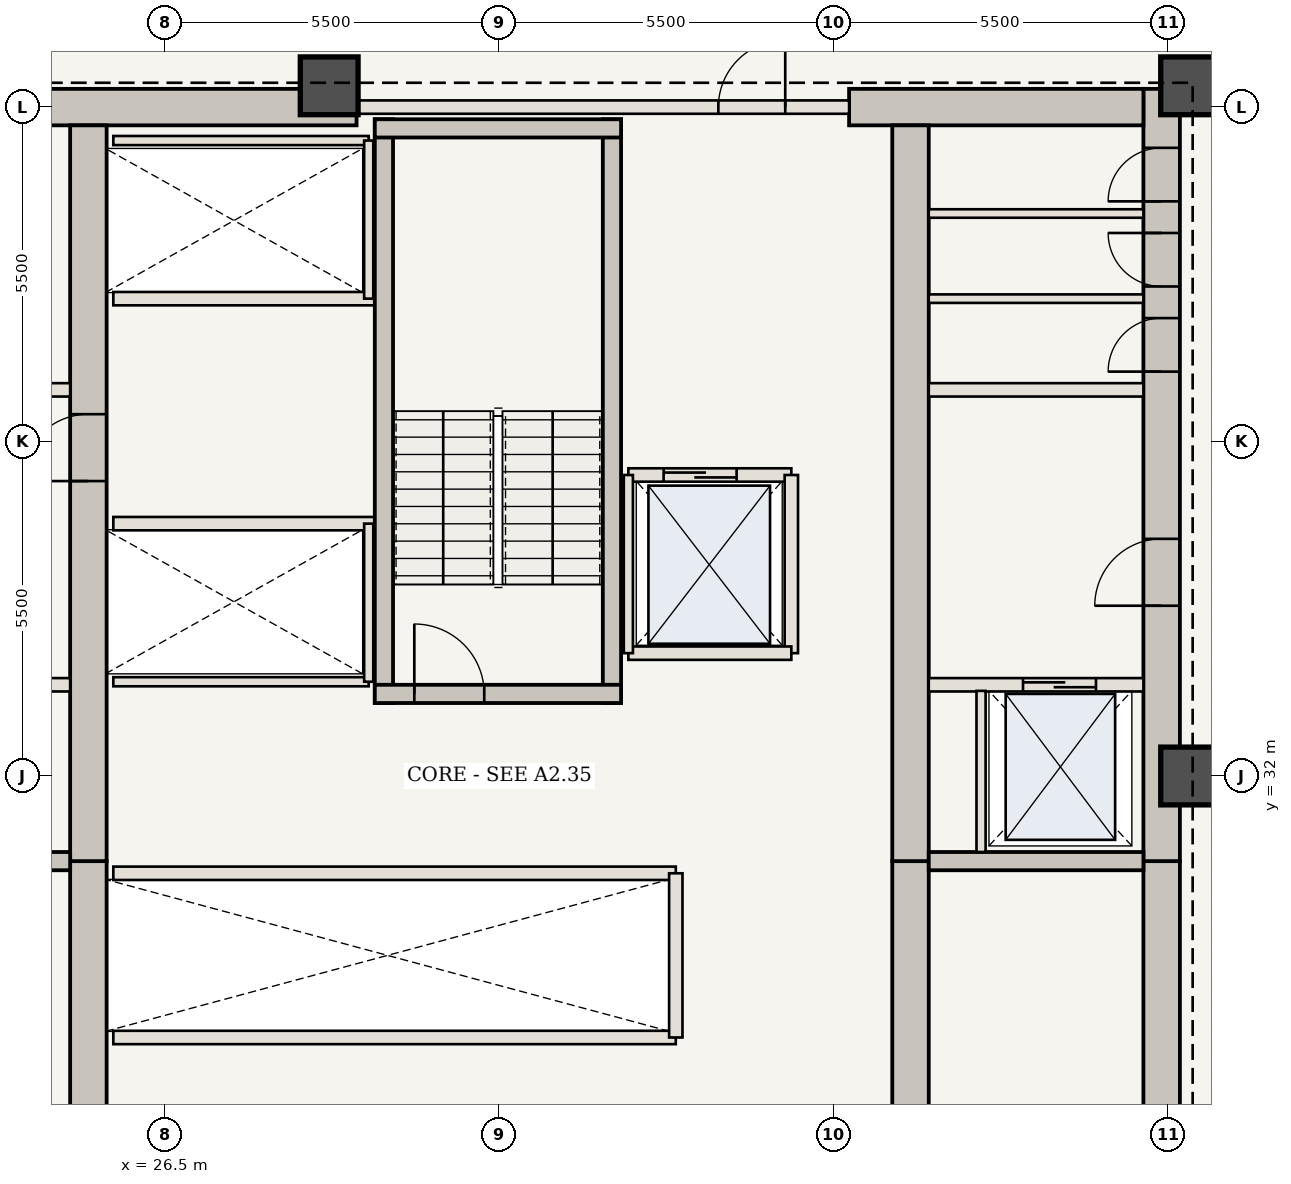
"""IFC4 building model, lengths in metres.
Left out: names, types, materials, properties, quantities, classifications, styles, units other than length and angle.
Written with IfcOpenShell. Run it as: python <this file> out.ifc"""

import sys

from ifc_helpers import new_model, si_unit, direction, frame, frame_2d, origin, origin_2d, place, context, subcontext, project, spatial, rectangle, extrude, element, fill, save


model = new_model("IFC4")
c1 = context("Model", 3, precision=1e-05, world=origin(), true_north=direction((0.0, 1.0)))
c2 = subcontext(c1, "Body", "Model", "MODEL_VIEW")
j1 = project(units=[si_unit("LENGTHUNIT", "METRE"), si_unit("PLANEANGLEUNIT", "RADIAN")], contexts=[c1])
p1 = place(None, origin())
s1 = spatial("IfcSite", under=j1, at=p1, CompositionType="ELEMENT")
p2 = place(p1, origin())
s2 = spatial("IfcBuilding", under=s1, at=p2, CompositionType="ELEMENT")
p3 = place(p2, frame((0.0, 0.0, 149.1)))
s3 = spatial("IfcBuildingStorey", under=s2, at=p3, CompositionType="ELEMENT", Elevation=149.1)
p4 = place(p3, frame((42.89, 20.65, 0.0), z_axis=(0.0, 0.0, 1.0), x_axis=(0.0, 1.0, 0.0)))
e1 = element("IfcWall", 1, at=p4, inside=s3, PredefinedType="SHEAR", context=c2, shape_type="SweptSolid", body=[
    extrude(rectangle(XDim=9.95, YDim=0.6, at=frame_2d((4.975, 0.0))), origin(), (0.0, 0.0, 1.0), 3.85),
])
p5 = place(p4, frame((1.1, 0.0, 0.0)))
e2 = element("IfcOpeningElement", 2, at=p5, cuts=e1, PredefinedType="OPENING", context=c2, shape_type="SweptSolid", body=[
    extrude(rectangle(XDim=1.15, YDim=2.15, at=frame_2d((0.575, 1.075))), frame((0.0, 0.31, 0.0), z_axis=(0.0, -1.0, 0.0), x_axis=(1.0, 0.0, 0.0)), (0.0, 0.0, 1.0), 0.62),
])
p6 = place(p3, frame((42.89, 30.6, 0.0), z_axis=(0.0, 0.0, 1.0), x_axis=(0.0, 1.0, 0.0)))
e3 = element("IfcWall", 3, at=p6, inside=s3, PredefinedType="SHEAR", context=c2, shape_type="SweptSolid", body=[
    extrude(rectangle(XDim=12.7, YDim=0.6, at=frame_2d((6.35, 0.0))), origin(), (0.0, 0.0, 1.0), 3.85),
])
p7 = place(p6, frame((4.2, 0.0, 0.0)))
e4 = element("IfcOpeningElement", 4, at=p7, cuts=e3, PredefinedType="OPENING", context=c2, shape_type="SweptSolid", body=[
    extrude(rectangle(XDim=1.1, YDim=2.15, at=frame_2d((0.55, 1.075))), frame((0.0, 0.31, 0.0), z_axis=(0.0, -1.0, 0.0), x_axis=(1.0, 0.0, 0.0)), (0.0, 0.0, 1.0), 0.62),
])
p8 = place(p6, frame((8.05, 0.0, 0.0)))
e5 = element("IfcOpeningElement", 5, at=p8, cuts=e3, PredefinedType="OPENING", context=c2, shape_type="SweptSolid", body=[
    extrude(rectangle(XDim=0.88, YDim=2.1, at=frame_2d((0.44, 1.05))), frame((0.0, 0.31, 0.0), z_axis=(0.0, -1.0, 0.0), x_axis=(1.0, 0.0, 0.0)), (0.0, 0.0, 1.0), 0.62),
])
p9 = place(p6, frame((9.45, 0.0, 0.0)))
e6 = element("IfcOpeningElement", 6, at=p9, cuts=e3, PredefinedType="OPENING", context=c2, shape_type="SweptSolid", body=[
    extrude(rectangle(XDim=0.88, YDim=2.1, at=frame_2d((0.44, 1.05))), frame((0.0, 0.31, 0.0), z_axis=(0.0, -1.0, 0.0), x_axis=(1.0, 0.0, 0.0)), (0.0, 0.0, 1.0), 0.62),
])
p10 = place(p6, frame((10.85, 0.0, 0.0)))
e7 = element("IfcOpeningElement", 7, at=p10, cuts=e3, PredefinedType="OPENING", context=c2, shape_type="SweptSolid", body=[
    extrude(rectangle(XDim=0.88, YDim=2.1, at=frame_2d((0.44, 1.05))), frame((0.0, 0.31, 0.0), z_axis=(0.0, -1.0, 0.0), x_axis=(1.0, 0.0, 0.0)), (0.0, 0.0, 1.0), 0.62),
])
p11 = place(p3, frame((21.41, 43.0, 0.0), z_axis=(0.0, 0.0, 1.0), x_axis=(1.0, 0.0, 0.0)))
e8 = element("IfcWall", 8, at=p11, inside=s3, PredefinedType="SHEAR", context=c2, shape_type="SweptSolid", body=[
    extrude(rectangle(XDim=8.24, YDim=0.6, at=frame_2d((4.12, 0.0))), origin(), (0.0, 0.0, 1.0), 3.85),
])
p12 = place(p3, frame((37.75, 43.0, 0.0), z_axis=(0.0, 0.0, 1.0), x_axis=(1.0, 0.0, 0.0)))
e9 = element("IfcWall", 9, at=p12, inside=s3, PredefinedType="SHEAR", context=c2, shape_type="SweptSolid", body=[
    extrude(rectangle(XDim=4.84, YDim=0.6, at=frame_2d((2.42, 0.0))), origin(), (0.0, 0.0, 1.0), 3.85),
])
p13 = place(p3, frame((25.24, 21.25, 0.0), z_axis=(0.0, 0.0, 1.0), x_axis=(0.0, 1.0, 0.0)))
e10 = element("IfcWall", 10, at=p13, inside=s3, PredefinedType="SHEAR", context=c2, shape_type="SweptSolid", body=[
    extrude(rectangle(XDim=9.35, YDim=0.6, at=frame_2d((4.675, 0.0))), origin(), (0.0, 0.0, 1.0), 3.85),
])
p14 = place(p3, frame((25.24, 30.6, 0.0), z_axis=(0.0, 0.0, 1.0), x_axis=(0.0, 1.0, 0.0)))
e11 = element("IfcWall", 11, at=p14, inside=s3, PredefinedType="SHEAR", context=c2, shape_type="SweptSolid", body=[
    extrude(rectangle(XDim=12.1, YDim=0.6, at=frame_2d((6.05, 0.0))), origin(), (0.0, 0.0, 1.0), 3.85),
])
p15 = place(p14, frame((6.25, 0.0, 0.0)))
e12 = element("IfcOpeningElement", 12, at=p15, cuts=e11, PredefinedType="OPENING", context=c2, shape_type="SweptSolid", body=[
    extrude(rectangle(XDim=1.1, YDim=2.15, at=frame_2d((0.55, 1.075))), frame((0.0, 0.31, 0.0), z_axis=(0.0, -1.0, 0.0), x_axis=(1.0, 0.0, 0.0)), (0.0, 0.0, 1.0), 0.62),
])
p16 = place(p3, frame((38.76, 21.25, 0.0), z_axis=(0.0, 0.0, 1.0), x_axis=(0.0, 1.0, 0.0)))
e13 = element("IfcWall", 13, at=p16, inside=s3, PredefinedType="SHEAR", context=c2, shape_type="SweptSolid", body=[
    extrude(rectangle(XDim=9.35, YDim=0.6, at=frame_2d((4.675, 0.0))), origin(), (0.0, 0.0, 1.0), 3.85),
])
p17 = place(p3, frame((38.76, 30.6, 0.0), z_axis=(0.0, 0.0, 1.0), x_axis=(0.0, 1.0, 0.0)))
e14 = element("IfcWall", 14, at=p17, inside=s3, PredefinedType="SHEAR", context=c2, shape_type="SweptSolid", body=[
    extrude(rectangle(XDim=12.1, YDim=0.6, at=frame_2d((6.05, 0.0))), origin(), (0.0, 0.0, 1.0), 3.85),
])
for number, where, z_axis, x_axis in (
    (15, (43.35, 32.0, 0.0), (0.0, 0.0, 1.0), (1.0, 0.0, 0.0)),
    (16, (43.35, 43.35, 0.0), (0.0, 0.0, 1.0), (1.0, 0.0, 0.0)),
    (17, (29.2, 43.35, 0.0), (0.0, 0.0, 1.0), (1.0, 0.0, 0.0)),
):
    element("IfcColumn", number, at=place(p3, frame(where, z_axis=z_axis, x_axis=x_axis)), inside=s3, PredefinedType="COLUMN", context=c2, shape_type="SweptSolid", body=[
        extrude(rectangle(XDim=0.95, YDim=0.95, at=origin_2d()), origin(), (0.0, 0.0, 1.0), 3.85),
    ])
for number, where, z_axis, x_axis in (
    (18, (21.41, 30.6, 0.0), (0.0, 0.0, 1.0), (1.0, 0.0, 0.0)),
    (19, (39.06, 30.6, 0.0), (0.0, 0.0, 1.0), (1.0, 0.0, 0.0)),
):
    element("IfcWall", number, at=place(p3, frame(where, z_axis=z_axis, x_axis=x_axis)), inside=s3, PredefinedType="SHEAR", context=c2, shape_type="SweptSolid", body=[
        extrude(rectangle(XDim=3.53, YDim=0.3, at=frame_2d((1.765, 0.0))), origin(), (0.0, 0.0, 1.0), 3.685),
    ])
p18 = place(p3, frame((21.41, 33.5, 0.0), z_axis=(0.0, 0.0, 1.0), x_axis=(1.0, 0.0, 0.0)))
e20 = element("IfcWall", 20, at=p18, inside=s3, PredefinedType="STANDARD", context=c2, shape_type="SweptSolid", body=[
    extrude(rectangle(XDim=3.53, YDim=0.22, at=frame_2d((1.765, 0.0))), origin(), (0.0, 0.0, 1.0), 3.685),
])
p19 = place(p18, frame((0.75, 0.0, 0.0)))
e21 = element("IfcOpeningElement", 21, at=p19, cuts=e20, PredefinedType="OPENING", context=c2, shape_type="SweptSolid", body=[
    extrude(rectangle(XDim=1.2, YDim=2.2, at=frame_2d((0.6, 1.1))), frame((0.0, 0.12, 0.0), z_axis=(0.0, -1.0, 0.0), x_axis=(1.0, 0.0, 0.0)), (0.0, 0.0, 1.0), 0.24),
])
p20 = place(p3, frame((39.06, 33.5, 0.0), z_axis=(0.0, 0.0, 1.0), x_axis=(1.0, 0.0, 0.0)))
e22 = element("IfcWall", 22, at=p20, inside=s3, PredefinedType="STANDARD", context=c2, shape_type="SweptSolid", body=[
    extrude(rectangle(XDim=3.53, YDim=0.22, at=frame_2d((1.765, 0.0))), origin(), (0.0, 0.0, 1.0), 3.685),
])
p21 = place(p20, frame((1.55, 0.0, 0.0)))
e23 = element("IfcOpeningElement", 23, at=p21, cuts=e22, PredefinedType="OPENING", context=c2, shape_type="SweptSolid", body=[
    extrude(rectangle(XDim=1.2, YDim=2.2, at=frame_2d((0.6, 1.1))), frame((0.0, 0.12, 0.0), z_axis=(0.0, -1.0, 0.0), x_axis=(1.0, 0.0, 0.0)), (0.0, 0.0, 1.0), 0.24),
])
p22 = place(p3, frame((39.92, 30.75, 0.0), z_axis=(0.0, 0.0, 1.0), x_axis=(0.0, 1.0, 0.0)))
e24 = element("IfcWall", 24, at=p22, inside=s3, PredefinedType="STANDARD", context=c2, shape_type="SweptSolid", body=[
    extrude(rectangle(XDim=2.65, YDim=0.15, at=frame_2d((1.325, 0.0))), origin(), (0.0, 0.0, 1.0), 3.685),
])
for number, where, z_axis, x_axis in (
    (25, (21.41, 38.35, 0.0), (0.0, 0.0, 1.0), (1.0, 0.0, 0.0)),
    (26, (39.06, 38.35, 0.0), (0.0, 0.0, 1.0), (1.0, 0.0, 0.0)),
):
    element("IfcWall", number, at=place(p3, frame(where, z_axis=z_axis, x_axis=x_axis)), inside=s3, PredefinedType="STANDARD", context=c2, shape_type="SweptSolid", body=[
        extrude(rectangle(XDim=3.53, YDim=0.22, at=frame_2d((1.765, 0.0))), origin(), (0.0, 0.0, 1.0), 3.685),
    ])
for number, where, z_axis, x_axis in (
    (27, (39.06, 39.85, 0.0), (0.0, 0.0, 1.0), (1.0, 0.0, 0.0)),
    (28, (39.06, 41.25, 0.0), (0.0, 0.0, 1.0), (1.0, 0.0, 0.0)),
):
    element("IfcWall", number, at=place(p3, frame(where, z_axis=z_axis, x_axis=x_axis)), inside=s3, PredefinedType="STANDARD", context=c2, shape_type="SweptSolid", body=[
        extrude(rectangle(XDim=3.53, YDim=0.14, at=frame_2d((1.765, 0.0))), origin(), (0.0, 0.0, 1.0), 3.685),
    ])
for number, where, z_axis, x_axis in (
    (29, (25.65, 27.7, 0.0), (0.0, 0.0, 1.0), (1.0, 0.0, 0.0)),
    (30, (25.65, 30.4, 0.0), (0.0, 0.0, 1.0), (1.0, 0.0, 0.0)),
):
    element("IfcWall", number, at=place(p3, frame(where, z_axis=z_axis, x_axis=x_axis)), inside=s3, PredefinedType="STANDARD", context=c2, shape_type="SweptSolid", body=[
        extrude(rectangle(XDim=9.25, YDim=0.22, at=frame_2d((4.625, 0.0))), origin(), (0.0, 0.0, 1.0), 3.685),
    ])
p23 = place(p3, frame((34.9, 27.7, 0.0), z_axis=(0.0, 0.0, 1.0), x_axis=(0.0, 1.0, 0.0)))
e31 = element("IfcWall", 31, at=p23, inside=s3, PredefinedType="STANDARD", context=c2, shape_type="SweptSolid", body=[
    extrude(rectangle(XDim=2.7, YDim=0.22, at=frame_2d((1.35, 0.0))), origin(), (0.0, 0.0, 1.0), 3.685),
])
p24 = place(p3, frame((25.65, 36.15, 0.0), z_axis=(0.0, 0.0, 1.0), x_axis=(1.0, 0.0, 0.0)))
e32 = element("IfcWall", 32, at=p24, inside=s3, PredefinedType="STANDARD", context=c2, shape_type="SweptSolid", body=[
    extrude(rectangle(XDim=4.3, YDim=0.22, at=frame_2d((2.15, 0.0))), origin(), (0.0, 0.0, 1.0), 3.685),
])
p25 = place(p3, frame((25.65, 33.55, 0.0), z_axis=(0.0, 0.0, 1.0), x_axis=(1.0, 0.0, 0.0)))
e33 = element("IfcWall", 33, at=p25, inside=s3, PredefinedType="STANDARD", context=c2, shape_type="SweptSolid", body=[
    extrude(rectangle(XDim=4.2, YDim=0.15, at=frame_2d((2.1, 0.0))), origin(), (0.0, 0.0, 1.0), 3.685),
])
p26 = place(p3, frame((29.85, 33.55, 0.0), z_axis=(0.0, 0.0, 1.0), x_axis=(0.0, 1.0, 0.0)))
e34 = element("IfcWall", 34, at=p26, inside=s3, PredefinedType="STANDARD", context=c2, shape_type="SweptSolid", body=[
    extrude(rectangle(XDim=2.6, YDim=0.15, at=frame_2d((1.3, 0.0))), origin(), (0.0, 0.0, 1.0), 3.685),
])
p27 = place(p3, frame((25.65, 39.85, 0.0), z_axis=(0.0, 0.0, 1.0), x_axis=(1.0, 0.0, 0.0)))
e35 = element("IfcWall", 35, at=p27, inside=s3, PredefinedType="STANDARD", context=c2, shape_type="SweptSolid", body=[
    extrude(rectangle(XDim=4.3, YDim=0.22, at=frame_2d((2.15, 0.0))), origin(), (0.0, 0.0, 1.0), 3.685),
])
p28 = place(p3, frame((25.65, 42.45, 0.0), z_axis=(0.0, 0.0, 1.0), x_axis=(1.0, 0.0, 0.0)))
e36 = element("IfcWall", 36, at=p28, inside=s3, PredefinedType="STANDARD", context=c2, shape_type="SweptSolid", body=[
    extrude(rectangle(XDim=4.2, YDim=0.15, at=frame_2d((2.1, 0.0))), origin(), (0.0, 0.0, 1.0), 3.685),
])
p29 = place(p3, frame((29.85, 39.85, 0.0), z_axis=(0.0, 0.0, 1.0), x_axis=(0.0, 1.0, 0.0)))
e37 = element("IfcWall", 37, at=p29, inside=s3, PredefinedType="STANDARD", context=c2, shape_type="SweptSolid", body=[
    extrude(rectangle(XDim=2.6, YDim=0.15, at=frame_2d((1.3, 0.0))), origin(), (0.0, 0.0, 1.0), 3.685),
])
for number, where, z_axis, x_axis in (
    (38, (30.1, 33.2, 0.0), (0.0, 0.0, 1.0), (0.0, 1.0, 0.0)),
    (39, (33.85, 33.2, 0.0), (0.0, 0.0, 1.0), (0.0, 1.0, 0.0)),
):
    element("IfcWall", number, at=place(p3, frame(where, z_axis=z_axis, x_axis=x_axis)), inside=s3, PredefinedType="SHEAR", context=c2, shape_type="SweptSolid", body=[
        extrude(rectangle(XDim=9.6, YDim=0.3, at=frame_2d((4.8, 0.0))), origin(), (0.0, 0.0, 1.0), 3.685),
    ])
p30 = place(p3, frame((29.95, 33.35, 0.0), z_axis=(0.0, 0.0, 1.0), x_axis=(1.0, 0.0, 0.0)))
e40 = element("IfcWall", 40, at=p30, inside=s3, PredefinedType="SHEAR", context=c2, shape_type="SweptSolid", body=[
    extrude(rectangle(XDim=4.05, YDim=0.3, at=frame_2d((2.025, 0.0))), origin(), (0.0, 0.0, 1.0), 3.685),
])
p31 = place(p30, frame((0.65, 0.0, 0.0)))
e41 = element("IfcOpeningElement", 41, at=p31, cuts=e40, PredefinedType="OPENING", context=c2, shape_type="SweptSolid", body=[
    extrude(rectangle(XDim=1.15, YDim=2.15, at=frame_2d((0.575, 1.075))), frame((0.0, 0.16, 0.0), z_axis=(0.0, -1.0, 0.0), x_axis=(1.0, 0.0, 0.0)), (0.0, 0.0, 1.0), 0.32),
])
p32 = place(p3, frame((29.95, 42.65, 0.0), z_axis=(0.0, 0.0, 1.0), x_axis=(1.0, 0.0, 0.0)))
e42 = element("IfcWall", 42, at=p32, inside=s3, PredefinedType="SHEAR", context=c2, shape_type="SweptSolid", body=[
    extrude(rectangle(XDim=4.05, YDim=0.3, at=frame_2d((2.025, 0.0))), origin(), (0.0, 0.0, 1.0), 3.685),
])
p33 = place(p3, frame((29.65, 43.0, 0.0), z_axis=(0.0, 0.0, 1.0), x_axis=(1.0, 0.0, 0.0)))
e43 = element("IfcWall", 43, at=p33, inside=s3, PredefinedType="STANDARD", context=c2, shape_type="SweptSolid", body=[
    extrude(rectangle(XDim=8.1, YDim=0.22, at=frame_2d((4.05, 0.0))), origin(), (0.0, 0.0, 1.0), 3.685),
])
p34 = place(p33, frame((5.95, 0.0, 0.0)))
e44 = element("IfcOpeningElement", 44, at=p34, cuts=e43, PredefinedType="OPENING", context=c2, shape_type="SweptSolid", body=[
    extrude(rectangle(XDim=1.1, YDim=2.15, at=frame_2d((0.55, 1.075))), frame((0.0, 0.12, 0.0), z_axis=(0.0, -1.0, 0.0), x_axis=(1.0, 0.0, 0.0)), (0.0, 0.0, 1.0), 0.24),
])
p35 = place(p3, frame((34.12, 36.95, 0.0), z_axis=(0.0, 0.0, 1.0), x_axis=(1.0, 0.0, 0.0)))
e45 = element("IfcWall", 45, at=p35, inside=s3, PredefinedType="STANDARD", context=c2, shape_type="SweptSolid", body=[
    extrude(rectangle(XDim=2.68, YDim=0.22, at=frame_2d((1.34, 0.0))), origin(), (0.0, 0.0, 1.0), 3.685),
])
p36 = place(p35, frame((0.58, 0.0, 0.0)))
e46 = element("IfcOpeningElement", 46, at=p36, cuts=e45, PredefinedType="OPENING", context=c2, shape_type="SweptSolid", body=[
    extrude(rectangle(XDim=1.2, YDim=2.2, at=frame_2d((0.6, 1.1))), frame((0.0, 0.12, 0.0), z_axis=(0.0, -1.0, 0.0), x_axis=(1.0, 0.0, 0.0)), (0.0, 0.0, 1.0), 0.24),
])
p37 = place(p3, frame((36.8, 34.02, 0.0), z_axis=(0.0, 0.0, 1.0), x_axis=(0.0, 1.0, 0.0)))
e47 = element("IfcWall", 47, at=p37, inside=s3, PredefinedType="STANDARD", context=c2, shape_type="SweptSolid", body=[
    extrude(rectangle(XDim=2.93, YDim=0.22, at=frame_2d((1.465, 0.0))), origin(), (0.0, 0.0, 1.0), 3.685),
])
p38 = place(p3, frame((34.12, 34.02, 0.0), z_axis=(0.0, 0.0, 1.0), x_axis=(1.0, 0.0, 0.0)))
e48 = element("IfcWall", 48, at=p38, inside=s3, PredefinedType="STANDARD", context=c2, shape_type="SweptSolid", body=[
    extrude(rectangle(XDim=2.68, YDim=0.22, at=frame_2d((1.34, 0.0))), origin(), (0.0, 0.0, 1.0), 3.685),
])
p39 = place(p3, frame((34.12, 34.02, 0.0), z_axis=(0.0, 0.0, 1.0), x_axis=(0.0, 1.0, 0.0)))
e49 = element("IfcWall", 49, at=p39, inside=s3, PredefinedType="STANDARD", context=c2, shape_type="SweptSolid", body=[
    extrude(rectangle(XDim=2.93, YDim=0.15, at=frame_2d((1.465, 0.0))), origin(), (0.0, 0.0, 1.0), 3.685),
])
p40 = place(p7, origin())
e50 = element("IfcDoor", 50, at=p40, inside=s3, OperationType="SINGLE_SWING_LEFT", PredefinedType="DOOR", context=c2, shape_type="SweptSolid", body=[
    extrude(rectangle(XDim=1.1, YDim=2.15, at=frame_2d((0.55, 1.075))), frame((0.0, 0.025, 0.0), z_axis=(0.0, -1.0, 0.0), x_axis=(1.0, 0.0, 0.0)), (0.0, 0.0, 1.0), 0.05),
])
fill(e4, e50)
p41 = place(p15, origin())
e51 = element("IfcDoor", 51, at=p41, inside=s3, OperationType="SINGLE_SWING_LEFT", PredefinedType="DOOR", context=c2, shape_type="SweptSolid", body=[
    extrude(rectangle(XDim=1.1, YDim=2.15, at=frame_2d((0.55, 1.075))), frame((0.0, 0.025, 0.0), z_axis=(0.0, -1.0, 0.0), x_axis=(1.0, 0.0, 0.0)), (0.0, 0.0, 1.0), 0.05),
])
fill(e12, e51)
p42 = place(p8, origin())
e52 = element("IfcDoor", 52, at=p42, inside=s3, OperationType="SINGLE_SWING_LEFT", PredefinedType="DOOR", context=c2, shape_type="SweptSolid", body=[
    extrude(rectangle(XDim=0.88, YDim=2.1, at=frame_2d((0.44, 1.05))), frame((0.0, 0.025, 0.0), z_axis=(0.0, -1.0, 0.0), x_axis=(1.0, 0.0, 0.0)), (0.0, 0.0, 1.0), 0.05),
])
fill(e5, e52)
p43 = place(p9, origin())
e53 = element("IfcDoor", 53, at=p43, inside=s3, OperationType="SINGLE_SWING_RIGHT", PredefinedType="DOOR", context=c2, shape_type="SweptSolid", body=[
    extrude(rectangle(XDim=0.88, YDim=2.1, at=frame_2d((0.44, 1.05))), frame((0.0, 0.025, 0.0), z_axis=(0.0, -1.0, 0.0), x_axis=(1.0, 0.0, 0.0)), (0.0, 0.0, 1.0), 0.05),
])
fill(e6, e53)
p44 = place(p10, origin())
e54 = element("IfcDoor", 54, at=p44, inside=s3, OperationType="SINGLE_SWING_LEFT", PredefinedType="DOOR", context=c2, shape_type="SweptSolid", body=[
    extrude(rectangle(XDim=0.88, YDim=2.1, at=frame_2d((0.44, 1.05))), frame((0.0, 0.025, 0.0), z_axis=(0.0, -1.0, 0.0), x_axis=(1.0, 0.0, 0.0)), (0.0, 0.0, 1.0), 0.05),
])
fill(e7, e54)
p45 = place(p21, origin())
e55 = element("IfcDoor", 55, at=p45, inside=s3, OperationType="DOUBLE_DOOR_SLIDING", PredefinedType="DOOR", context=c2, shape_type="SweptSolid", body=[
    extrude(rectangle(XDim=1.2, YDim=2.2, at=frame_2d((0.6, 1.1))), frame((0.0, 0.025, 0.0), z_axis=(0.0, -1.0, 0.0), x_axis=(1.0, 0.0, 0.0)), (0.0, 0.0, 1.0), 0.05),
])
fill(e23, e55)
p46 = place(p31, origin())
e56 = element("IfcDoor", 56, at=p46, inside=s3, OperationType="SINGLE_SWING_LEFT", PredefinedType="DOOR", context=c2, shape_type="SweptSolid", body=[
    extrude(rectangle(XDim=1.15, YDim=2.15, at=frame_2d((0.575, 1.075))), frame((0.0, 0.025, 0.0), z_axis=(0.0, -1.0, 0.0), x_axis=(1.0, 0.0, 0.0)), (0.0, 0.0, 1.0), 0.05),
])
fill(e41, e56)
p47 = place(p34, origin())
e57 = element("IfcDoor", 57, at=p47, inside=s3, OperationType="SINGLE_SWING_RIGHT", PredefinedType="DOOR", context=c2, shape_type="SweptSolid", body=[
    extrude(rectangle(XDim=1.1, YDim=2.15, at=frame_2d((0.55, 1.075))), frame((0.0, 0.025, 0.0), z_axis=(0.0, -1.0, 0.0), x_axis=(1.0, 0.0, 0.0)), (0.0, 0.0, 1.0), 0.05),
])
fill(e44, e57)
p48 = place(p36, origin())
e58 = element("IfcDoor", 58, at=p48, inside=s3, OperationType="DOUBLE_DOOR_SLIDING", PredefinedType="DOOR", context=c2, shape_type="SweptSolid", body=[
    extrude(rectangle(XDim=1.2, YDim=2.2, at=frame_2d((0.6, 1.1))), frame((0.0, 0.025, 0.0), z_axis=(0.0, -1.0, 0.0), x_axis=(1.0, 0.0, 0.0)), (0.0, 0.0, 1.0), 0.05),
])
fill(e46, e58)
save(model, sys.argv[1])
